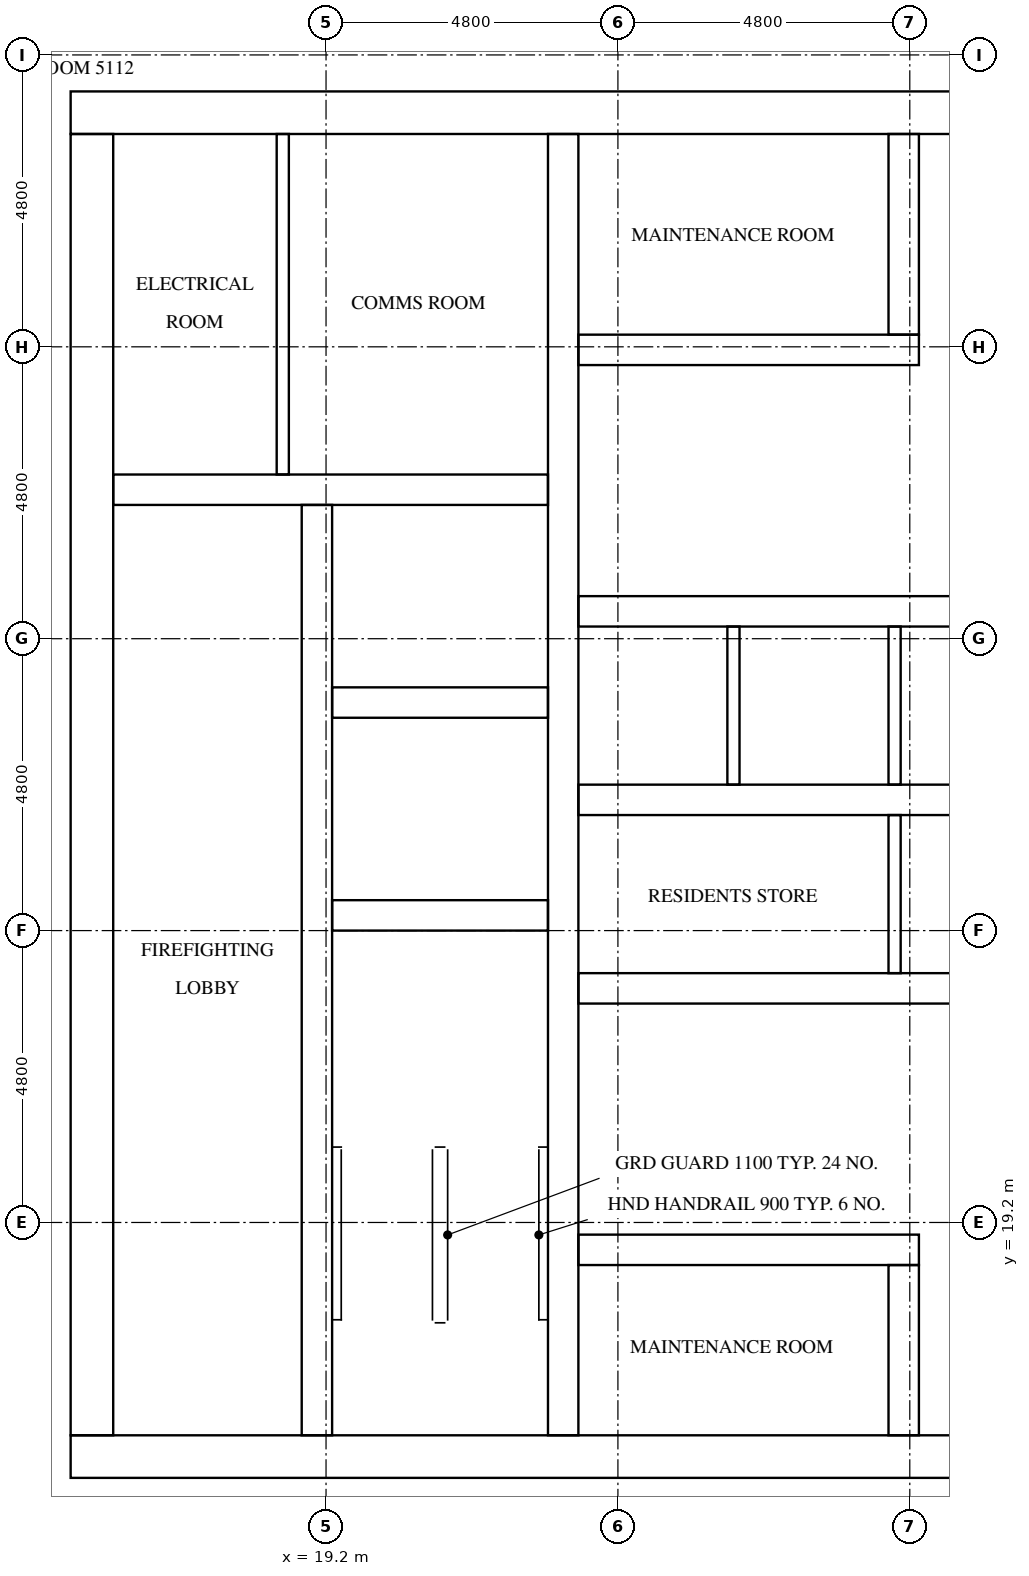
"""IFC4 building model, lengths in metres.
Left out: names, types, materials, properties, quantities, classifications, styles, units other than length and angle.
Written with IfcOpenShell. Run it as: python <this file> out.ifc"""

import sys

from ifc_helpers import new_model, si_unit, direction, frame, frame_2d, origin, place, context, subcontext, project, spatial, rectangle, extrude, element, fill, save


model = new_model("IFC4")
c1 = context("Model", 3, precision=1e-05, world=origin(), true_north=direction((0.0, 1.0)))
c2 = subcontext(c1, "Body", "Model", "MODEL_VIEW")
j1 = project(units=[si_unit("LENGTHUNIT", "METRE"), si_unit("PLANEANGLEUNIT", "RADIAN")], contexts=[c1])
p1 = place(None, origin())
s1 = spatial("IfcSite", under=j1, at=p1, CompositionType="ELEMENT")
p2 = place(p1, origin())
s2 = spatial("IfcBuilding", under=s1, at=p2, CompositionType="ELEMENT")
p3 = place(p2, frame((0.0, 0.0, 196.4)))
s3 = spatial("IfcBuildingStorey", under=s2, at=p3, CompositionType="ELEMENT", Elevation=196.4)
p4 = place(p3, frame((15.0, 15.35, 0.0), z_axis=(0.0, 0.0, 1.0), x_axis=(1.0, 0.0, 0.0)))
e1 = element("IfcWall", 1, at=p4, inside=s3, PredefinedType="SHEAR", context=c2, shape_type="SweptSolid", body=[
    extrude(rectangle(XDim=32.4, YDim=0.7, at=frame_2d((16.2, 0.0))), origin(), (0.0, 0.0, 1.0), 3.2),
])
p5 = place(p4, frame((15.3, 0.0, 0.0)))
e2 = element("IfcOpeningElement", 2, at=p5, cuts=e1, PredefinedType="OPENING", context=c2, shape_type="SweptSolid", body=[
    extrude(rectangle(XDim=1.8, YDim=2.1, at=frame_2d((0.9, 1.05))), frame((0.0, 0.36, 0.0), z_axis=(0.0, -1.0, 0.0), x_axis=(1.0, 0.0, 0.0)), (0.0, 0.0, 1.0), 0.72),
])
p6 = place(p3, frame((15.0, 37.45, 0.0), z_axis=(0.0, 0.0, 1.0), x_axis=(1.0, 0.0, 0.0)))
e3 = element("IfcWall", 3, at=p6, inside=s3, PredefinedType="SHEAR", context=c2, shape_type="SweptSolid", body=[
    extrude(rectangle(XDim=32.4, YDim=0.7, at=frame_2d((16.2, 0.0))), origin(), (0.0, 0.0, 1.0), 3.2),
])
p7 = place(p6, frame((15.3, 0.0, 0.0)))
e4 = element("IfcOpeningElement", 4, at=p7, cuts=e3, PredefinedType="OPENING", context=c2, shape_type="SweptSolid", body=[
    extrude(rectangle(XDim=1.8, YDim=2.1, at=frame_2d((0.9, 1.05))), frame((0.0, 0.36, 0.0), z_axis=(0.0, -1.0, 0.0), x_axis=(1.0, 0.0, 0.0)), (0.0, 0.0, 1.0), 0.72),
])
p8 = place(p6, frame((1.544, 0.0, 0.0)))
e5 = element("IfcOpeningElement", 5, at=p8, cuts=e3, PredefinedType="OPENING", context=c2, shape_type="SweptSolid", body=[
    extrude(rectangle(XDim=1.0, YDim=2.1, at=frame_2d((0.5, 1.05))), frame((0.0, 0.36, 0.0), z_axis=(0.0, -1.0, 0.0), x_axis=(1.0, 0.0, 0.0)), (0.0, 0.0, 1.0), 0.72),
])
p9 = place(p6, frame((5.219, 0.0, 0.0)))
e6 = element("IfcOpeningElement", 6, at=p9, cuts=e3, PredefinedType="OPENING", context=c2, shape_type="SweptSolid", body=[
    extrude(rectangle(XDim=1.0, YDim=2.1, at=frame_2d((0.5, 1.05))), frame((0.0, 0.36, 0.0), z_axis=(0.0, -1.0, 0.0), x_axis=(1.0, 0.0, 0.0)), (0.0, 0.0, 1.0), 0.72),
])
p10 = place(p3, frame((15.35, 15.7, 0.0), z_axis=(0.0, 0.0, 1.0), x_axis=(0.0, 1.0, 0.0)))
e7 = element("IfcWall", 7, at=p10, inside=s3, PredefinedType="SHEAR", context=c2, shape_type="SweptSolid", body=[
    extrude(rectangle(XDim=21.4, YDim=0.7, at=frame_2d((10.7, 0.0))), origin(), (0.0, 0.0, 1.0), 3.2),
])
p11 = place(p10, frame((5.06, 0.0, 0.0)))
e8 = element("IfcOpeningElement", 8, at=p11, cuts=e7, PredefinedType="OPENING", context=c2, shape_type="SweptSolid", body=[
    extrude(rectangle(XDim=1.2, YDim=2.1, at=frame_2d((0.6, 1.05))), frame((0.0, 0.36, 0.0), z_axis=(0.0, -1.0, 0.0), x_axis=(1.0, 0.0, 0.0)), (0.0, 0.0, 1.0), 0.72),
])
p12 = place(p3, frame((19.05, 15.7, 0.0), z_axis=(0.0, 0.0, 1.0), x_axis=(0.0, 1.0, 0.0)))
e9 = element("IfcWall", 9, at=p12, inside=s3, PredefinedType="SHEAR", context=c2, shape_type="SweptSolid", body=[
    extrude(rectangle(XDim=15.3, YDim=0.5, at=frame_2d((7.65, 0.0))), origin(), (0.0, 0.0, 1.0), 3.2),
])
p13 = place(p12, frame((9.75, 0.0, 0.0)))
e10 = element("IfcOpeningElement", 10, at=p13, cuts=e9, PredefinedType="OPENING", context=c2, shape_type="SweptSolid", body=[
    extrude(rectangle(XDim=1.1, YDim=2.1, at=frame_2d((0.55, 1.05))), frame((0.0, 0.26, 0.0), z_axis=(0.0, -1.0, 0.0), x_axis=(1.0, 0.0, 0.0)), (0.0, 0.0, 1.0), 0.52),
])
p14 = place(p12, frame((13.25, 0.0, 0.0)))
e11 = element("IfcOpeningElement", 11, at=p14, cuts=e9, PredefinedType="OPENING", context=c2, shape_type="SweptSolid", body=[
    extrude(rectangle(XDim=1.1, YDim=2.1, at=frame_2d((0.55, 1.05))), frame((0.0, 0.26, 0.0), z_axis=(0.0, -1.0, 0.0), x_axis=(1.0, 0.0, 0.0)), (0.0, 0.0, 1.0), 0.52),
])
p15 = place(p12, frame((0.5, 0.0, 0.0)))
e12 = element("IfcOpeningElement", 12, at=p15, cuts=e9, PredefinedType="OPENING", context=c2, shape_type="SweptSolid", body=[
    extrude(rectangle(XDim=1.2, YDim=2.1, at=frame_2d((0.6, 1.05))), frame((0.0, 0.26, 0.0), z_axis=(0.0, -1.0, 0.0), x_axis=(1.0, 0.0, 0.0)), (0.0, 0.0, 1.0), 0.52),
])
p16 = place(p3, frame((23.1, 15.7, 0.0), z_axis=(0.0, 0.0, 1.0), x_axis=(0.0, 1.0, 0.0)))
e13 = element("IfcWall", 13, at=p16, inside=s3, PredefinedType="SHEAR", context=c2, shape_type="SweptSolid", body=[
    extrude(rectangle(XDim=21.4, YDim=0.5, at=frame_2d((10.7, 0.0))), origin(), (0.0, 0.0, 1.0), 3.2),
])
for number, where, z_axis, x_axis in (
    (14, (19.3, 24.25, 0.0), (0.0, 0.0, 1.0), (1.0, 0.0, 0.0)),
    (15, (19.3, 27.75, 0.0), (0.0, 0.0, 1.0), (1.0, 0.0, 0.0)),
):
    element("IfcWall", number, at=place(p3, frame(where, z_axis=z_axis, x_axis=x_axis)), inside=s3, PredefinedType="SHEAR", context=c2, shape_type="SweptSolid", body=[
        extrude(rectangle(XDim=3.55, YDim=0.5, at=frame_2d((1.775, 0.0))), origin(), (0.0, 0.0, 1.0), 3.2),
    ])
p17 = place(p3, frame((15.7, 31.25, 0.0), z_axis=(0.0, 0.0, 1.0), x_axis=(1.0, 0.0, 0.0)))
e16 = element("IfcWall", 16, at=p17, inside=s3, PredefinedType="SHEAR", context=c2, shape_type="SweptSolid", body=[
    extrude(rectangle(XDim=7.15, YDim=0.5, at=frame_2d((3.575, 0.0))), origin(), (0.0, 0.0, 1.0), 3.2),
])
p18 = place(p3, frame((23.35, 18.75, 0.0), z_axis=(0.0, 0.0, 1.0), x_axis=(1.0, 0.0, 0.0)))
e17 = element("IfcWall", 17, at=p18, inside=s3, PredefinedType="SHEAR", context=c2, shape_type="SweptSolid", body=[
    extrude(rectangle(XDim=5.6, YDim=0.5, at=frame_2d((2.8, 0.0))), origin(), (0.0, 0.0, 1.0), 3.2),
])
p19 = place(p18, frame((2.05, 0.0, 0.0)))
e18 = element("IfcOpeningElement", 18, at=p19, cuts=e17, PredefinedType="OPENING", context=c2, shape_type="SweptSolid", body=[
    extrude(rectangle(XDim=1.0, YDim=2.1, at=frame_2d((0.5, 1.05))), frame((0.0, 0.26, 0.0), z_axis=(0.0, -1.0, 0.0), x_axis=(1.0, 0.0, 0.0)), (0.0, 0.0, 1.0), 0.52),
])
p20 = place(p3, frame((23.35, 23.05, 0.0), z_axis=(0.0, 0.0, 1.0), x_axis=(1.0, 0.0, 0.0)))
e19 = element("IfcWall", 19, at=p20, inside=s3, PredefinedType="SHEAR", context=c2, shape_type="SweptSolid", body=[
    extrude(rectangle(XDim=15.7, YDim=0.5, at=frame_2d((7.85, 0.0))), origin(), (0.0, 0.0, 1.0), 3.2),
])
p21 = place(p20, frame((2.05, 0.0, 0.0)))
e20 = element("IfcOpeningElement", 20, at=p21, cuts=e19, PredefinedType="OPENING", context=c2, shape_type="SweptSolid", body=[
    extrude(rectangle(XDim=1.0, YDim=2.1, at=frame_2d((0.5, 1.05))), frame((0.0, 0.26, 0.0), z_axis=(0.0, -1.0, 0.0), x_axis=(1.0, 0.0, 0.0)), (0.0, 0.0, 1.0), 0.52),
])
p22 = place(p20, frame((12.65, 0.0, 0.0)))
e21 = element("IfcOpeningElement", 21, at=p22, cuts=e19, PredefinedType="OPENING", context=c2, shape_type="SweptSolid", body=[
    extrude(rectangle(XDim=1.0, YDim=2.1, at=frame_2d((0.5, 1.05))), frame((0.0, 0.26, 0.0), z_axis=(0.0, -1.0, 0.0), x_axis=(1.0, 0.0, 0.0)), (0.0, 0.0, 1.0), 0.52),
])
p23 = place(p3, frame((23.35, 26.15, 0.0), z_axis=(0.0, 0.0, 1.0), x_axis=(1.0, 0.0, 0.0)))
e22 = element("IfcWall", 22, at=p23, inside=s3, PredefinedType="SHEAR", context=c2, shape_type="SweptSolid", body=[
    extrude(rectangle(XDim=15.7, YDim=0.5, at=frame_2d((7.85, 0.0))), origin(), (0.0, 0.0, 1.0), 3.2),
])
p24 = place(p3, frame((23.35, 29.25, 0.0), z_axis=(0.0, 0.0, 1.0), x_axis=(1.0, 0.0, 0.0)))
e23 = element("IfcWall", 23, at=p24, inside=s3, PredefinedType="SHEAR", context=c2, shape_type="SweptSolid", body=[
    extrude(rectangle(XDim=15.7, YDim=0.5, at=frame_2d((7.85, 0.0))), origin(), (0.0, 0.0, 1.0), 3.2),
])
p25 = place(p24, frame((0.675, 0.0, 0.0)))
e24 = element("IfcOpeningElement", 24, at=p25, cuts=e23, PredefinedType="OPENING", context=c2, shape_type="SweptSolid", body=[
    extrude(rectangle(XDim=1.1, YDim=2.1, at=frame_2d((0.55, 1.05))), frame((0.0, 0.26, 0.0), z_axis=(0.0, -1.0, 0.0), x_axis=(1.0, 0.0, 0.0)), (0.0, 0.0, 1.0), 0.52),
])
p26 = place(p24, frame((3.325, 0.0, 0.0)))
e25 = element("IfcOpeningElement", 25, at=p26, cuts=e23, PredefinedType="OPENING", context=c2, shape_type="SweptSolid", body=[
    extrude(rectangle(XDim=1.1, YDim=2.1, at=frame_2d((0.55, 1.05))), frame((0.0, 0.26, 0.0), z_axis=(0.0, -1.0, 0.0), x_axis=(1.0, 0.0, 0.0)), (0.0, 0.0, 1.0), 0.52),
])
p27 = place(p24, frame((5.975, 0.0, 0.0)))
e26 = element("IfcOpeningElement", 26, at=p27, cuts=e23, PredefinedType="OPENING", context=c2, shape_type="SweptSolid", body=[
    extrude(rectangle(XDim=1.1, YDim=2.1, at=frame_2d((0.55, 1.05))), frame((0.0, 0.26, 0.0), z_axis=(0.0, -1.0, 0.0), x_axis=(1.0, 0.0, 0.0)), (0.0, 0.0, 1.0), 0.52),
])
p28 = place(p24, frame((8.625, 0.0, 0.0)))
e27 = element("IfcOpeningElement", 27, at=p28, cuts=e23, PredefinedType="OPENING", context=c2, shape_type="SweptSolid", body=[
    extrude(rectangle(XDim=1.1, YDim=2.1, at=frame_2d((0.55, 1.05))), frame((0.0, 0.26, 0.0), z_axis=(0.0, -1.0, 0.0), x_axis=(1.0, 0.0, 0.0)), (0.0, 0.0, 1.0), 0.52),
])
p29 = place(p24, frame((11.275, 0.0, 0.0)))
e28 = element("IfcOpeningElement", 28, at=p29, cuts=e23, PredefinedType="OPENING", context=c2, shape_type="SweptSolid", body=[
    extrude(rectangle(XDim=1.1, YDim=2.1, at=frame_2d((0.55, 1.05))), frame((0.0, 0.26, 0.0), z_axis=(0.0, -1.0, 0.0), x_axis=(1.0, 0.0, 0.0)), (0.0, 0.0, 1.0), 0.52),
])
p30 = place(p24, frame((13.925, 0.0, 0.0)))
e29 = element("IfcOpeningElement", 29, at=p30, cuts=e23, PredefinedType="OPENING", context=c2, shape_type="SweptSolid", body=[
    extrude(rectangle(XDim=1.1, YDim=2.1, at=frame_2d((0.55, 1.05))), frame((0.0, 0.26, 0.0), z_axis=(0.0, -1.0, 0.0), x_axis=(1.0, 0.0, 0.0)), (0.0, 0.0, 1.0), 0.52),
])
p31 = place(p3, frame((23.35, 33.55, 0.0), z_axis=(0.0, 0.0, 1.0), x_axis=(1.0, 0.0, 0.0)))
e30 = element("IfcWall", 30, at=p31, inside=s3, PredefinedType="SHEAR", context=c2, shape_type="SweptSolid", body=[
    extrude(rectangle(XDim=5.6, YDim=0.5, at=frame_2d((2.8, 0.0))), origin(), (0.0, 0.0, 1.0), 3.2),
])
p32 = place(p31, frame((2.05, 0.0, 0.0)))
e31 = element("IfcOpeningElement", 31, at=p32, cuts=e30, PredefinedType="OPENING", context=c2, shape_type="SweptSolid", body=[
    extrude(rectangle(XDim=1.0, YDim=2.1, at=frame_2d((0.5, 1.05))), frame((0.0, 0.26, 0.0), z_axis=(0.0, -1.0, 0.0), x_axis=(1.0, 0.0, 0.0)), (0.0, 0.0, 1.0), 0.52),
])
p33 = place(p3, frame((28.7, 15.7, 0.0), z_axis=(0.0, 0.0, 1.0), x_axis=(0.0, 1.0, 0.0)))
e32 = element("IfcWall", 32, at=p33, inside=s3, PredefinedType="SHEAR", context=c2, shape_type="SweptSolid", body=[
    extrude(rectangle(XDim=2.8, YDim=0.5, at=frame_2d((1.4, 0.0))), origin(), (0.0, 0.0, 1.0), 3.2),
])
p34 = place(p3, frame((28.7, 33.8, 0.0), z_axis=(0.0, 0.0, 1.0), x_axis=(0.0, 1.0, 0.0)))
e33 = element("IfcWall", 33, at=p34, inside=s3, PredefinedType="SHEAR", context=c2, shape_type="SweptSolid", body=[
    extrude(rectangle(XDim=3.3, YDim=0.5, at=frame_2d((1.65, 0.0))), origin(), (0.0, 0.0, 1.0), 3.2),
])
p35 = place(p3, frame((25.9, 26.4, 0.0), z_axis=(0.0, 0.0, 1.0), x_axis=(0.0, 1.0, 0.0)))
e34 = element("IfcWall", 34, at=p35, inside=s3, PredefinedType="SOLIDWALL", context=c2, shape_type="SweptSolid", body=[
    extrude(rectangle(XDim=2.6, YDim=0.2, at=frame_2d((1.3, 0.0))), origin(), (0.0, 0.0, 1.0), 3.2),
])
p36 = place(p3, frame((28.55, 23.3, 0.0), z_axis=(0.0, 0.0, 1.0), x_axis=(0.0, 1.0, 0.0)))
e35 = element("IfcWall", 35, at=p36, inside=s3, PredefinedType="SOLIDWALL", context=c2, shape_type="SweptSolid", body=[
    extrude(rectangle(XDim=2.6, YDim=0.2, at=frame_2d((1.3, 0.0))), origin(), (0.0, 0.0, 1.0), 3.2),
])
p37 = place(p3, frame((28.55, 26.4, 0.0), z_axis=(0.0, 0.0, 1.0), x_axis=(0.0, 1.0, 0.0)))
e36 = element("IfcWall", 36, at=p37, inside=s3, PredefinedType="SOLIDWALL", context=c2, shape_type="SweptSolid", body=[
    extrude(rectangle(XDim=2.6, YDim=0.2, at=frame_2d((1.3, 0.0))), origin(), (0.0, 0.0, 1.0), 3.2),
])
p38 = place(p3, frame((18.489, 31.5, 0.0), z_axis=(0.0, 0.0, 1.0), x_axis=(0.0, 1.0, 0.0)))
e37 = element("IfcWall", 37, at=p38, inside=s3, PredefinedType="PARTITIONING", context=c2, shape_type="SweptSolid", body=[
    extrude(rectangle(XDim=5.6, YDim=0.2, at=frame_2d((2.8, 0.0))), origin(), (0.0, 0.0, 1.0), 3.2),
])
p39 = place(p25, origin())
e38 = element("IfcDoor", 38, at=p39, inside=s3, OperationType="DOUBLE_DOOR_SLIDING", PredefinedType="DOOR", context=c2, shape_type="SweptSolid", body=[
    extrude(rectangle(XDim=1.1, YDim=2.1, at=frame_2d((0.55, 1.05))), frame((0.0, 0.025, 0.0), z_axis=(0.0, -1.0, 0.0), x_axis=(1.0, 0.0, 0.0)), (0.0, 0.0, 1.0), 0.05),
])
fill(e24, e38)
p40 = place(p26, origin())
e39 = element("IfcDoor", 39, at=p40, inside=s3, OperationType="DOUBLE_DOOR_SLIDING", PredefinedType="DOOR", context=c2, shape_type="SweptSolid", body=[
    extrude(rectangle(XDim=1.1, YDim=2.1, at=frame_2d((0.55, 1.05))), frame((0.0, 0.025, 0.0), z_axis=(0.0, -1.0, 0.0), x_axis=(1.0, 0.0, 0.0)), (0.0, 0.0, 1.0), 0.05),
])
fill(e25, e39)
p41 = place(p27, origin())
e40 = element("IfcDoor", 40, at=p41, inside=s3, OperationType="DOUBLE_DOOR_SLIDING", PredefinedType="DOOR", context=c2, shape_type="SweptSolid", body=[
    extrude(rectangle(XDim=1.1, YDim=2.1, at=frame_2d((0.55, 1.05))), frame((0.0, 0.025, 0.0), z_axis=(0.0, -1.0, 0.0), x_axis=(1.0, 0.0, 0.0)), (0.0, 0.0, 1.0), 0.05),
])
fill(e26, e40)
p42 = place(p13, origin())
e41 = element("IfcDoor", 41, at=p42, inside=s3, OperationType="DOUBLE_DOOR_SLIDING", PredefinedType="DOOR", context=c2, shape_type="SweptSolid", body=[
    extrude(rectangle(XDim=1.1, YDim=2.1, at=frame_2d((0.55, 1.05))), frame((0.0, 0.025, 0.0), z_axis=(0.0, -1.0, 0.0), x_axis=(1.0, 0.0, 0.0)), (0.0, 0.0, 1.0), 0.05),
])
fill(e10, e41)
p43 = place(p14, origin())
e42 = element("IfcDoor", 42, at=p43, inside=s3, OperationType="DOUBLE_DOOR_SLIDING", PredefinedType="DOOR", context=c2, shape_type="SweptSolid", body=[
    extrude(rectangle(XDim=1.1, YDim=2.1, at=frame_2d((0.55, 1.05))), frame((0.0, 0.025, 0.0), z_axis=(0.0, -1.0, 0.0), x_axis=(1.0, 0.0, 0.0)), (0.0, 0.0, 1.0), 0.05),
])
fill(e11, e42)
p44 = place(p15, frame((1.2, 0.0, 0.0), z_axis=(0.0, 0.0, 1.0), x_axis=(-1.0, 0.0, 0.0)))
e43 = element("IfcDoor", 43, at=p44, inside=s3, OperationType="SINGLE_SWING_LEFT", PredefinedType="DOOR", context=c2, shape_type="SweptSolid", body=[
    extrude(rectangle(XDim=1.2, YDim=2.1, at=frame_2d((0.6, 1.05))), frame((0.0, 0.025, 0.0), z_axis=(0.0, -1.0, 0.0), x_axis=(1.0, 0.0, 0.0)), (0.0, 0.0, 1.0), 0.05),
])
fill(e12, e43)
p45 = place(p11, frame((1.2, 0.0, 0.0), z_axis=(0.0, 0.0, 1.0), x_axis=(-1.0, 0.0, 0.0)))
e44 = element("IfcDoor", 44, at=p45, inside=s3, OperationType="SINGLE_SWING_RIGHT", PredefinedType="DOOR", context=c2, shape_type="SweptSolid", body=[
    extrude(rectangle(XDim=1.2, YDim=2.1, at=frame_2d((0.6, 1.05))), frame((0.0, 0.025, 0.0), z_axis=(0.0, -1.0, 0.0), x_axis=(1.0, 0.0, 0.0)), (0.0, 0.0, 1.0), 0.05),
])
fill(e8, e44)
p46 = place(p8, origin())
e45 = element("IfcDoor", 45, at=p46, inside=s3, OperationType="SINGLE_SWING_RIGHT", PredefinedType="DOOR", context=c2, shape_type="SweptSolid", body=[
    extrude(rectangle(XDim=1.0, YDim=2.1, at=frame_2d((0.5, 1.05))), frame((0.0, 0.025, 0.0), z_axis=(0.0, -1.0, 0.0), x_axis=(1.0, 0.0, 0.0)), (0.0, 0.0, 1.0), 0.05),
])
fill(e5, e45)
p47 = place(p9, origin())
e46 = element("IfcDoor", 46, at=p47, inside=s3, OperationType="SINGLE_SWING_LEFT", PredefinedType="DOOR", context=c2, shape_type="SweptSolid", body=[
    extrude(rectangle(XDim=1.0, YDim=2.1, at=frame_2d((0.5, 1.05))), frame((0.0, 0.025, 0.0), z_axis=(0.0, -1.0, 0.0), x_axis=(1.0, 0.0, 0.0)), (0.0, 0.0, 1.0), 0.05),
])
fill(e6, e46)
p48 = place(p21, frame((1.0, 0.0, 0.0), z_axis=(0.0, 0.0, 1.0), x_axis=(-1.0, 0.0, 0.0)))
e47 = element("IfcDoor", 47, at=p48, inside=s3, OperationType="SINGLE_SWING_RIGHT", PredefinedType="DOOR", context=c2, shape_type="SweptSolid", body=[
    extrude(rectangle(XDim=1.0, YDim=2.1, at=frame_2d((0.5, 1.05))), frame((0.0, 0.025, 0.0), z_axis=(0.0, -1.0, 0.0), x_axis=(1.0, 0.0, 0.0)), (0.0, 0.0, 1.0), 0.05),
])
fill(e20, e47)
p49 = place(p19, origin())
e48 = element("IfcDoor", 48, at=p49, inside=s3, OperationType="SINGLE_SWING_RIGHT", PredefinedType="DOOR", context=c2, shape_type="SweptSolid", body=[
    extrude(rectangle(XDim=1.0, YDim=2.1, at=frame_2d((0.5, 1.05))), frame((0.0, 0.025, 0.0), z_axis=(0.0, -1.0, 0.0), x_axis=(1.0, 0.0, 0.0)), (0.0, 0.0, 1.0), 0.05),
])
fill(e18, e48)
p50 = place(p32, frame((1.0, 0.0, 0.0), z_axis=(0.0, 0.0, 1.0), x_axis=(-1.0, 0.0, 0.0)))
e49 = element("IfcDoor", 49, at=p50, inside=s3, OperationType="SINGLE_SWING_RIGHT", PredefinedType="DOOR", context=c2, shape_type="SweptSolid", body=[
    extrude(rectangle(XDim=1.0, YDim=2.1, at=frame_2d((0.5, 1.05))), frame((0.0, 0.025, 0.0), z_axis=(0.0, -1.0, 0.0), x_axis=(1.0, 0.0, 0.0)), (0.0, 0.0, 1.0), 0.05),
])
fill(e31, e49)
save(model, sys.argv[1])
